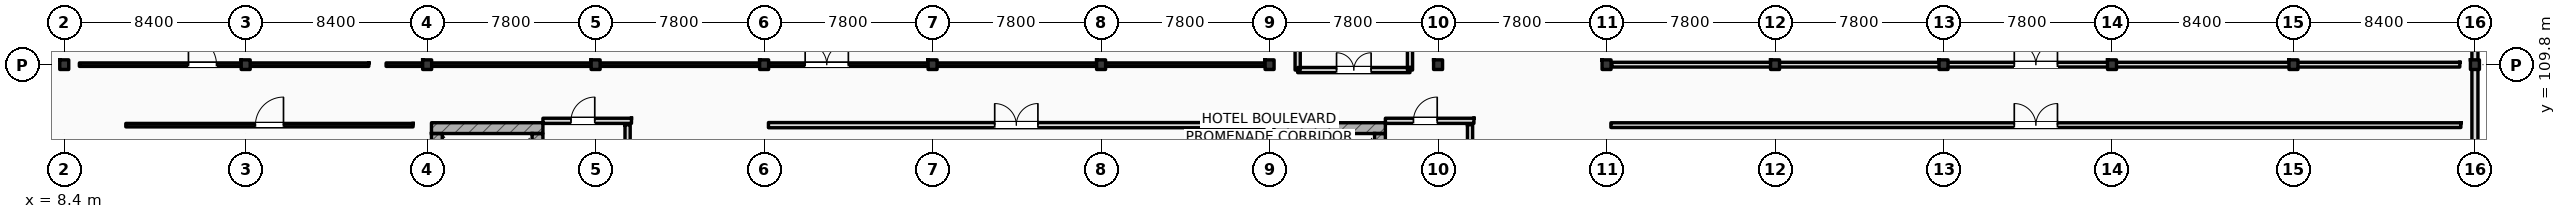
"""IFC4 building model, lengths in metres.
Left out: names, types, materials, properties, quantities, classifications, styles, units other than length and angle.
Written with IfcOpenShell. Run it as: python <this file> out.ifc"""

import sys

from ifc_helpers import new_model, si_unit, direction, frame, frame_2d, origin, origin_2d, place, context, subcontext, project, spatial, rectangle, i_section, extrude, element, fill, save


model = new_model("IFC4")
c1 = context("Model", 3, precision=1e-05, world=origin(), true_north=direction((0.0, 1.0)))
c2 = subcontext(c1, "Body", "Model", "MODEL_VIEW")
j1 = project(units=[si_unit("LENGTHUNIT", "METRE"), si_unit("PLANEANGLEUNIT", "RADIAN")], contexts=[c1])
p1 = place(None, origin())
s1 = spatial("IfcSite", under=j1, at=p1, CompositionType="ELEMENT")
p2 = place(p1, origin())
s2 = spatial("IfcBuilding", under=s1, at=p2, CompositionType="ELEMENT")
p3 = place(p2, origin())
s3 = spatial("IfcBuildingStorey", under=s2, at=p3, CompositionType="ELEMENT", Elevation=0.0)
for number, where, z_axis, x_axis in (
    (1, (8.4, 109.8, 0.0), (0.0, 0.0, 1.0), (1.0, 0.0, 0.0)),
    (2, (16.8, 109.8, 0.0), (0.0, 0.0, 1.0), (1.0, 0.0, 0.0)),
    (3, (25.2, 109.8, 0.0), (0.0, 0.0, 1.0), (1.0, 0.0, 0.0)),
    (4, (33.0, 109.8, 0.0), (0.0, 0.0, 1.0), (1.0, 0.0, 0.0)),
    (5, (40.8, 109.8, 0.0), (0.0, 0.0, 1.0), (1.0, 0.0, 0.0)),
    (6, (48.6, 109.8, 0.0), (0.0, 0.0, 1.0), (1.0, 0.0, 0.0)),
    (7, (56.4, 109.8, 0.0), (0.0, 0.0, 1.0), (1.0, 0.0, 0.0)),
    (8, (64.2, 109.8, 0.0), (0.0, 0.0, 1.0), (1.0, 0.0, 0.0)),
    (9, (72.0, 109.8, 0.0), (0.0, 0.0, 1.0), (1.0, 0.0, 0.0)),
    (10, (79.8, 109.8, 0.0), (0.0, 0.0, 1.0), (1.0, 0.0, 0.0)),
    (11, (87.6, 109.8, 0.0), (0.0, 0.0, 1.0), (1.0, 0.0, 0.0)),
    (12, (95.4, 109.8, 0.0), (0.0, 0.0, 1.0), (1.0, 0.0, 0.0)),
    (13, (103.2, 109.8, 0.0), (0.0, 0.0, 1.0), (1.0, 0.0, 0.0)),
    (14, (111.6, 109.8, 0.0), (0.0, 0.0, 1.0), (1.0, 0.0, 0.0)),
    (15, (120.0, 109.8, 0.0), (0.0, 0.0, 1.0), (1.0, 0.0, 0.0)),
):
    element("IfcColumn", number, at=place(p3, frame(where, z_axis=z_axis, x_axis=x_axis)), inside=s3, PredefinedType="COLUMN", context=c2, shape_type="SweptSolid", body=[
        extrude(i_section(OverallWidth=0.416, OverallDepth=0.446, WebThickness=0.036, FlangeThickness=0.048, FilletRadius=0.015, at=origin_2d()), origin(), (0.0, 0.0, 1.0), 6.0),
    ])
p4 = place(p3, frame((25.4, 106.862, 0.0), z_axis=(0.0, 0.0, 1.0), x_axis=(1.0, 0.0, 0.0)))
e16 = element("IfcWall", 16, at=p4, inside=s3, PredefinedType="SHEAR", context=c2, shape_type="SweptSolid", body=[
    extrude(rectangle(XDim=5.16, YDim=0.5, at=frame_2d((2.58, 0.0))), origin(), (0.0, 0.0, 1.0), 6.0),
])
p5 = place(p3, frame((25.65, 97.5, 0.0), z_axis=(0.0, 0.0, 1.0), x_axis=(0.0, 1.0, 0.0)))
e17 = element("IfcWall", 17, at=p5, inside=s3, PredefinedType="SHEAR", context=c2, shape_type="SweptSolid", body=[
    extrude(rectangle(XDim=9.112, YDim=0.5, at=frame_2d((4.556, 0.0))), origin(), (0.0, 0.0, 1.0), 6.0),
])
p6 = place(p3, frame((30.31, 97.5, 0.0), z_axis=(0.0, 0.0, 1.0), x_axis=(0.0, 1.0, 0.0)))
e18 = element("IfcWall", 18, at=p6, inside=s3, PredefinedType="SHEAR", context=c2, shape_type="SweptSolid", body=[
    extrude(rectangle(XDim=9.112, YDim=0.5, at=frame_2d((4.556, 0.0))), origin(), (0.0, 0.0, 1.0), 6.0),
])
p7 = place(p6, frame((0.44, 0.0, 0.0)))
e19 = element("IfcOpeningElement", 19, at=p7, cuts=e18, PredefinedType="OPENING", context=c2, shape_type="SweptSolid", body=[
    extrude(rectangle(XDim=1.1, YDim=2.2, at=frame_2d((0.55, 1.1))), frame((0.0, 0.26, 0.0), z_axis=(0.0, -1.0, 0.0), x_axis=(1.0, 0.0, 0.0)), (0.0, 0.0, 1.0), 0.52),
])
p8 = place(p3, frame((64.4, 106.862, 0.0), z_axis=(0.0, 0.0, 1.0), x_axis=(1.0, 0.0, 0.0)))
e20 = element("IfcWall", 20, at=p8, inside=s3, PredefinedType="SHEAR", context=c2, shape_type="SweptSolid", body=[
    extrude(rectangle(XDim=5.16, YDim=0.5, at=frame_2d((2.58, 0.0))), origin(), (0.0, 0.0, 1.0), 6.0),
])
p9 = place(p3, frame((64.65, 97.5, 0.0), z_axis=(0.0, 0.0, 1.0), x_axis=(0.0, 1.0, 0.0)))
e21 = element("IfcWall", 21, at=p9, inside=s3, PredefinedType="SHEAR", context=c2, shape_type="SweptSolid", body=[
    extrude(rectangle(XDim=9.112, YDim=0.5, at=frame_2d((4.556, 0.0))), origin(), (0.0, 0.0, 1.0), 6.0),
])
p10 = place(p3, frame((69.31, 97.5, 0.0), z_axis=(0.0, 0.0, 1.0), x_axis=(0.0, 1.0, 0.0)))
e22 = element("IfcWall", 22, at=p10, inside=s3, PredefinedType="SHEAR", context=c2, shape_type="SweptSolid", body=[
    extrude(rectangle(XDim=9.112, YDim=0.5, at=frame_2d((4.556, 0.0))), origin(), (0.0, 0.0, 1.0), 6.0),
])
p11 = place(p10, frame((0.44, 0.0, 0.0)))
e23 = element("IfcOpeningElement", 23, at=p11, cuts=e22, PredefinedType="OPENING", context=c2, shape_type="SweptSolid", body=[
    extrude(rectangle(XDim=1.1, YDim=2.2, at=frame_2d((0.55, 1.1))), frame((0.0, 0.26, 0.0), z_axis=(0.0, -1.0, 0.0), x_axis=(1.0, 0.0, 0.0)), (0.0, 0.0, 1.0), 0.52),
])
p12 = place(p3, frame((120.0, 96.0, 0.0), z_axis=(0.0, 0.0, 1.0), x_axis=(0.0, 1.0, 0.0)))
e24 = element("IfcWall", 24, at=p12, inside=s3, PredefinedType="STANDARD", context=c2, shape_type="SweptSolid", body=[
    extrude(rectangle(XDim=22.0, YDim=0.28, at=frame_2d((11.0, 0.0))), origin(), (0.0, 0.0, 1.0), 5.24),
])
p13 = place(p3, frame((34.48, 98.78, 0.0), z_axis=(0.0, 0.0, 1.0), x_axis=(0.0, 1.0, 0.0)))
e25 = element("IfcWall", 25, at=p13, inside=s3, PredefinedType="STANDARD", context=c2, shape_type="SweptSolid", body=[
    extrude(rectangle(XDim=8.24, YDim=0.24, at=frame_2d((4.12, 0.0))), origin(), (0.0, 0.0, 1.0), 5.7),
])
p14 = place(p3, frame((30.56, 107.2, 0.0), z_axis=(0.0, 0.0, 1.0), x_axis=(1.0, 0.0, 0.0)))
e26 = element("IfcWall", 26, at=p14, inside=s3, PredefinedType="STANDARD", context=c2, shape_type="SweptSolid", body=[
    extrude(rectangle(XDim=4.1, YDim=0.24, at=frame_2d((2.05, 0.0))), origin(), (0.0, 0.0, 1.0), 5.7),
])
p15 = place(p14, frame((1.3, 0.0, 0.0)))
e27 = element("IfcOpeningElement", 27, at=p15, cuts=e26, PredefinedType="OPENING", context=c2, shape_type="SweptSolid", body=[
    extrude(rectangle(XDim=1.1, YDim=2.2, at=frame_2d((0.55, 1.1))), frame((0.0, 0.13, 0.0), z_axis=(0.0, -1.0, 0.0), x_axis=(1.0, 0.0, 0.0)), (0.0, 0.0, 1.0), 0.26),
])
p16 = place(p3, frame((73.48, 98.78, 0.0), z_axis=(0.0, 0.0, 1.0), x_axis=(0.0, 1.0, 0.0)))
e28 = element("IfcWall", 28, at=p16, inside=s3, PredefinedType="STANDARD", context=c2, shape_type="SweptSolid", body=[
    extrude(rectangle(XDim=8.24, YDim=0.24, at=frame_2d((4.12, 0.0))), origin(), (0.0, 0.0, 1.0), 5.7),
])
p17 = place(p3, frame((69.56, 107.2, 0.0), z_axis=(0.0, 0.0, 1.0), x_axis=(1.0, 0.0, 0.0)))
e29 = element("IfcWall", 29, at=p17, inside=s3, PredefinedType="STANDARD", context=c2, shape_type="SweptSolid", body=[
    extrude(rectangle(XDim=4.1, YDim=0.24, at=frame_2d((2.05, 0.0))), origin(), (0.0, 0.0, 1.0), 5.7),
])
p18 = place(p17, frame((1.3, 0.0, 0.0)))
e30 = element("IfcOpeningElement", 30, at=p18, cuts=e29, PredefinedType="OPENING", context=c2, shape_type="SweptSolid", body=[
    extrude(rectangle(XDim=1.1, YDim=2.2, at=frame_2d((0.55, 1.1))), frame((0.0, 0.13, 0.0), z_axis=(0.0, -1.0, 0.0), x_axis=(1.0, 0.0, 0.0)), (0.0, 0.0, 1.0), 0.26),
])
p19 = place(p3, frame((23.3, 109.8, 0.0), z_axis=(0.0, 0.0, 1.0), x_axis=(1.0, 0.0, 0.0)))
e31 = element("IfcWall", 31, at=p19, inside=s3, PredefinedType="PARTITIONING", context=c2, shape_type="SweptSolid", body=[
    extrude(rectangle(XDim=40.8, YDim=0.16, at=frame_2d((20.4, 0.0))), origin(), (0.0, 0.0, 1.0), 5.14),
])
p20 = place(p19, frame((19.4, 0.0, 0.0)))
e32 = element("IfcOpeningElement", 32, at=p20, cuts=e31, PredefinedType="OPENING", context=c2, shape_type="SweptSolid", body=[
    extrude(rectangle(XDim=2.0, YDim=2.5, at=frame_2d((1.0, 1.25))), frame((0.0, 0.09, 0.0), z_axis=(0.0, -1.0, 0.0), x_axis=(1.0, 0.0, 0.0)), (0.0, 0.0, 1.0), 0.18),
])
p21 = place(p3, frame((11.25, 107.0, 0.0), z_axis=(0.0, 0.0, 1.0), x_axis=(1.0, 0.0, 0.0)))
e33 = element("IfcWall", 33, at=p21, inside=s3, PredefinedType="PARTITIONING", context=c2, shape_type="SweptSolid", body=[
    extrude(rectangle(XDim=13.3, YDim=0.16, at=frame_2d((6.65, 0.0))), origin(), (0.0, 0.0, 1.0), 5.7),
])
p22 = place(p21, frame((6.0, 0.0, 0.0)))
e34 = element("IfcOpeningElement", 34, at=p22, cuts=e33, PredefinedType="OPENING", context=c2, shape_type="SweptSolid", body=[
    extrude(rectangle(XDim=1.3, YDim=2.2, at=frame_2d((0.65, 1.1))), frame((0.0, 0.09, 0.0), z_axis=(0.0, -1.0, 0.0), x_axis=(1.0, 0.0, 0.0)), (0.0, 0.0, 1.0), 0.18),
])
p23 = place(p3, frame((80.05, 109.8, 0.0), z_axis=(0.0, 0.0, 1.0), x_axis=(1.0, 0.0, 0.0)))
e35 = element("IfcWall", 35, at=p23, inside=s3, PredefinedType="PARTITIONING", context=c2, shape_type="SweptSolid", body=[
    extrude(rectangle(XDim=39.25, YDim=0.22, at=frame_2d((19.625, 0.0))), origin(), (0.0, 0.0, 1.0), 5.14),
])
p24 = place(p23, frame((18.625, 0.0, 0.0)))
e36 = element("IfcOpeningElement", 36, at=p24, cuts=e35, PredefinedType="OPENING", context=c2, shape_type="SweptSolid", body=[
    extrude(rectangle(XDim=2.0, YDim=2.35, at=frame_2d((1.0, 1.175))), frame((0.0, 0.12, 0.0), z_axis=(0.0, -1.0, 0.0), x_axis=(1.0, 0.0, 0.0)), (0.0, 0.0, 1.0), 0.24),
])
p25 = place(p3, frame((80.0, 107.0, 0.0), z_axis=(0.0, 0.0, 1.0), x_axis=(1.0, 0.0, 0.0)))
e37 = element("IfcWall", 37, at=p25, inside=s3, PredefinedType="PARTITIONING", context=c2, shape_type="SweptSolid", body=[
    extrude(rectangle(XDim=39.35, YDim=0.22, at=frame_2d((19.675, 0.0))), origin(), (0.0, 0.0, 1.0), 5.7),
])
p26 = place(p25, frame((18.675, 0.0, 0.0)))
e38 = element("IfcOpeningElement", 38, at=p26, cuts=e37, PredefinedType="OPENING", context=c2, shape_type="SweptSolid", body=[
    extrude(rectangle(XDim=2.0, YDim=2.35, at=frame_2d((1.0, 1.175))), frame((0.0, 0.12, 0.0), z_axis=(0.0, -1.0, 0.0), x_axis=(1.0, 0.0, 0.0)), (0.0, 0.0, 1.0), 0.24),
])
p27 = place(p3, frame((9.1, 109.8, 0.0), z_axis=(0.0, 0.0, 1.0), x_axis=(1.0, 0.0, 0.0)))
e39 = element("IfcWall", 39, at=p27, inside=s3, PredefinedType="PARTITIONING", context=c2, shape_type="SweptSolid", body=[
    extrude(rectangle(XDim=13.4, YDim=0.16, at=frame_2d((6.7, 0.0))), origin(), (0.0, 0.0, 1.0), 5.14),
])
p28 = place(p27, frame((5.05, 0.0, 0.0)))
e40 = element("IfcOpeningElement", 40, at=p28, cuts=e39, PredefinedType="OPENING", context=c2, shape_type="SweptSolid", body=[
    extrude(rectangle(XDim=1.3, YDim=2.2, at=frame_2d((0.65, 1.1))), frame((0.0, 0.09, 0.0), z_axis=(0.0, -1.0, 0.0), x_axis=(1.0, 0.0, 0.0)), (0.0, 0.0, 1.0), 0.18),
])
p29 = place(p3, frame((41.0, 107.0, 0.0), z_axis=(0.0, 0.0, 1.0), x_axis=(1.0, 0.0, 0.0)))
e41 = element("IfcWall", 41, at=p29, inside=s3, PredefinedType="STANDARD", context=c2, shape_type="SweptSolid", body=[
    extrude(rectangle(XDim=22.95, YDim=0.24, at=frame_2d((11.475, 0.0))), origin(), (0.0, 0.0, 1.0), 5.7),
])
p30 = place(p29, frame((10.475, 0.0, 0.0)))
e42 = element("IfcOpeningElement", 42, at=p30, cuts=e41, PredefinedType="OPENING", context=c2, shape_type="SweptSolid", body=[
    extrude(rectangle(XDim=2.0, YDim=2.35, at=frame_2d((1.0, 1.175))), frame((0.0, 0.13, 0.0), z_axis=(0.0, -1.0, 0.0), x_axis=(1.0, 0.0, 0.0)), (0.0, 0.0, 1.0), 0.26),
])
for number, where, z_axis, x_axis in (
    (43, (65.5, 109.55, 0.0), (0.0, 0.0, 1.0), (0.0, 1.0, 0.0)),
    (44, (70.7, 109.55, 0.0), (0.0, 0.0, 1.0), (0.0, 1.0, 0.0)),
):
    element("IfcWall", number, at=place(p3, frame(where, z_axis=z_axis, x_axis=x_axis)), inside=s3, PredefinedType="STANDARD", context=c2, shape_type="SweptSolid", body=[
        extrude(rectangle(XDim=8.29, YDim=0.24, at=frame_2d((4.145, 0.0))), origin(), (0.0, 0.0, 1.0), 5.7),
    ])
p31 = place(p3, frame((65.5, 109.55, 0.0), z_axis=(0.0, 0.0, 1.0), x_axis=(1.0, 0.0, 0.0)))
e45 = element("IfcWall", 45, at=p31, inside=s3, PredefinedType="STANDARD", context=c2, shape_type="SweptSolid", body=[
    extrude(rectangle(XDim=5.2, YDim=0.24, at=frame_2d((2.6, 0.0))), origin(), (0.0, 0.0, 1.0), 5.19),
])
p32 = place(p31, frame((1.8, 0.0, 0.0)))
e46 = element("IfcOpeningElement", 46, at=p32, cuts=e45, PredefinedType="OPENING", context=c2, shape_type="SweptSolid", body=[
    extrude(rectangle(XDim=1.6, YDim=2.2, at=frame_2d((0.8, 1.1))), frame((0.0, 0.13, 0.0), z_axis=(0.0, -1.0, 0.0), x_axis=(1.0, 0.0, 0.0)), (0.0, 0.0, 1.0), 0.26),
])
p33 = place(p15, origin())
e47 = element("IfcDoor", 47, at=p33, inside=s3, OperationType="SINGLE_SWING_RIGHT", PredefinedType="DOOR", context=c2, shape_type="SweptSolid", body=[
    extrude(rectangle(XDim=1.1, YDim=2.2, at=frame_2d((0.55, 1.1))), frame((0.0, 0.025, 0.0), z_axis=(0.0, -1.0, 0.0), x_axis=(1.0, 0.0, 0.0)), (0.0, 0.0, 1.0), 0.05),
])
fill(e27, e47)
p34 = place(p18, origin())
e48 = element("IfcDoor", 48, at=p34, inside=s3, OperationType="SINGLE_SWING_RIGHT", PredefinedType="DOOR", context=c2, shape_type="SweptSolid", body=[
    extrude(rectangle(XDim=1.1, YDim=2.2, at=frame_2d((0.55, 1.1))), frame((0.0, 0.025, 0.0), z_axis=(0.0, -1.0, 0.0), x_axis=(1.0, 0.0, 0.0)), (0.0, 0.0, 1.0), 0.05),
])
fill(e30, e48)
p35 = place(p20, origin())
e49 = element("IfcDoor", 49, at=p35, inside=s3, OperationType="DOUBLE_SWING_RIGHT", PredefinedType="DOOR", context=c2, shape_type="SweptSolid", body=[
    extrude(rectangle(XDim=2.0, YDim=2.5, at=frame_2d((1.0, 1.25))), frame((0.0, 0.025, 0.0), z_axis=(0.0, -1.0, 0.0), x_axis=(1.0, 0.0, 0.0)), (0.0, 0.0, 1.0), 0.05),
])
fill(e32, e49)
p36 = place(p22, origin())
e50 = element("IfcDoor", 50, at=p36, inside=s3, OperationType="SINGLE_SWING_RIGHT", PredefinedType="DOOR", context=c2, shape_type="SweptSolid", body=[
    extrude(rectangle(XDim=1.3, YDim=2.2, at=frame_2d((0.65, 1.1))), frame((0.0, 0.025, 0.0), z_axis=(0.0, -1.0, 0.0), x_axis=(1.0, 0.0, 0.0)), (0.0, 0.0, 1.0), 0.05),
])
fill(e34, e50)
p37 = place(p24, origin())
e51 = element("IfcDoor", 51, at=p37, inside=s3, OperationType="DOUBLE_SWING_LEFT", PredefinedType="DOOR", context=c2, shape_type="SweptSolid", body=[
    extrude(rectangle(XDim=2.0, YDim=2.35, at=frame_2d((1.0, 1.175))), frame((0.0, 0.025, 0.0), z_axis=(0.0, -1.0, 0.0), x_axis=(1.0, 0.0, 0.0)), (0.0, 0.0, 1.0), 0.05),
])
fill(e36, e51)
p38 = place(p26, origin())
e52 = element("IfcDoor", 52, at=p38, inside=s3, OperationType="DOUBLE_SWING_LEFT", PredefinedType="DOOR", context=c2, shape_type="SweptSolid", body=[
    extrude(rectangle(XDim=2.0, YDim=2.35, at=frame_2d((1.0, 1.175))), frame((0.0, 0.025, 0.0), z_axis=(0.0, -1.0, 0.0), x_axis=(1.0, 0.0, 0.0)), (0.0, 0.0, 1.0), 0.05),
])
fill(e38, e52)
p39 = place(p28, origin())
e53 = element("IfcDoor", 53, at=p39, inside=s3, OperationType="SINGLE_SWING_LEFT", PredefinedType="DOOR", context=c2, shape_type="SweptSolid", body=[
    extrude(rectangle(XDim=1.3, YDim=2.2, at=frame_2d((0.65, 1.1))), frame((0.0, 0.025, 0.0), z_axis=(0.0, -1.0, 0.0), x_axis=(1.0, 0.0, 0.0)), (0.0, 0.0, 1.0), 0.05),
])
fill(e40, e53)
p40 = place(p30, origin())
e54 = element("IfcDoor", 54, at=p40, inside=s3, OperationType="DOUBLE_SWING_LEFT", PredefinedType="DOOR", context=c2, shape_type="SweptSolid", body=[
    extrude(rectangle(XDim=2.0, YDim=2.35, at=frame_2d((1.0, 1.175))), frame((0.0, 0.025, 0.0), z_axis=(0.0, -1.0, 0.0), x_axis=(1.0, 0.0, 0.0)), (0.0, 0.0, 1.0), 0.05),
])
fill(e42, e54)
p41 = place(p32, origin())
e55 = element("IfcDoor", 55, at=p41, inside=s3, OperationType="DOUBLE_SWING_LEFT", PredefinedType="DOOR", context=c2, shape_type="SweptSolid", body=[
    extrude(rectangle(XDim=1.6, YDim=2.2, at=frame_2d((0.8, 1.1))), frame((0.0, 0.025, 0.0), z_axis=(0.0, -1.0, 0.0), x_axis=(1.0, 0.0, 0.0)), (0.0, 0.0, 1.0), 0.05),
])
fill(e46, e55)
save(model, sys.argv[1])
